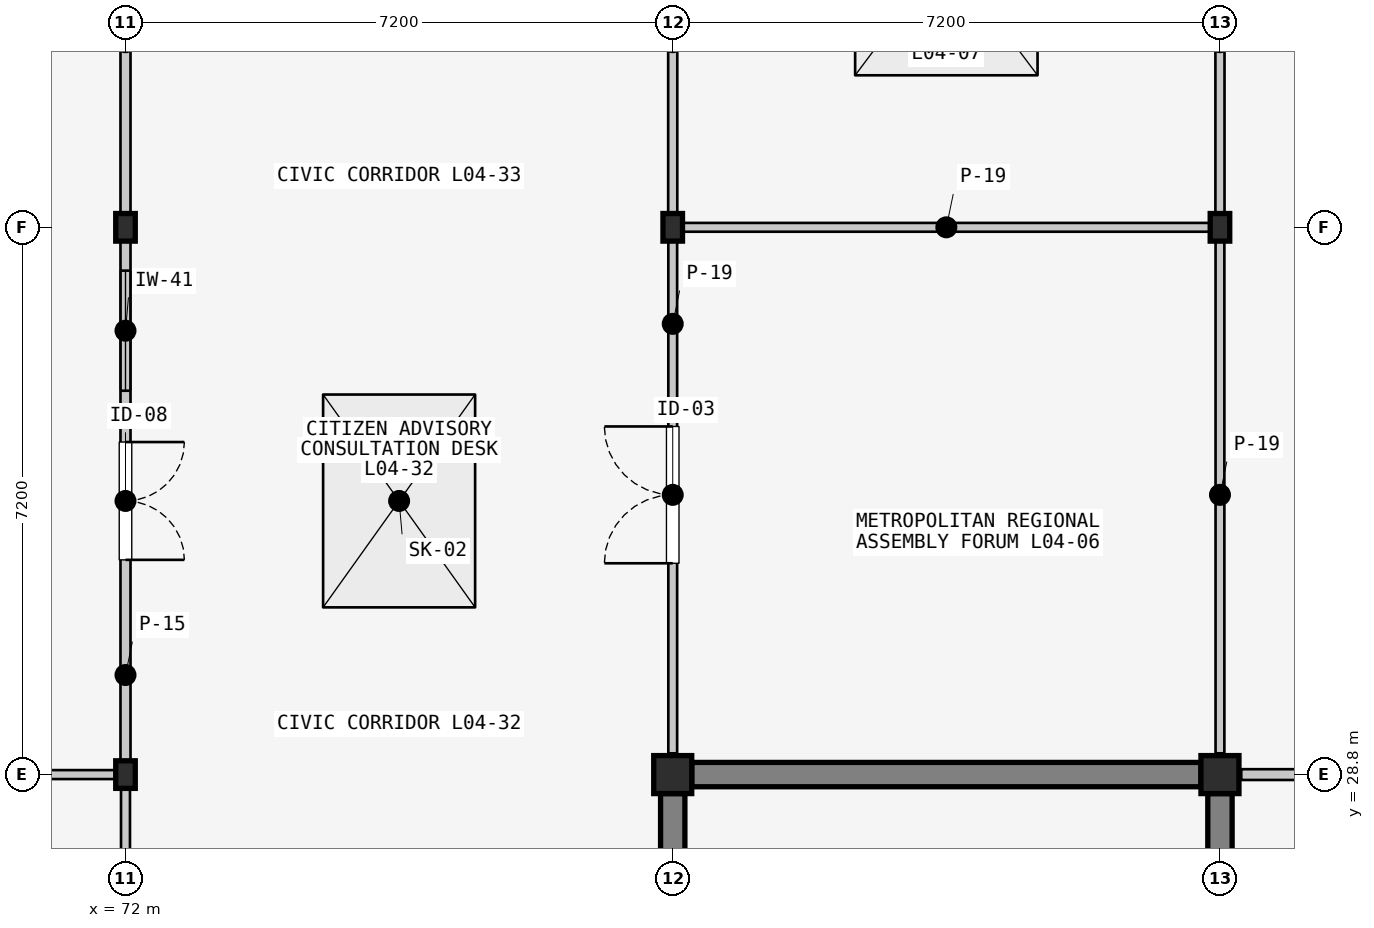
"""IFC4 building model, lengths in metres.
Left out: names, types, materials, properties, quantities, classifications, styles, units other than length and angle.
Written with IfcOpenShell. Run it as: python <this file> out.ifc"""

import sys

from ifc_helpers import new_model, si_unit, direction, frame, frame_2d, origin, origin_2d, place, context, subcontext, project, spatial, rectangle, i_section, extrude, element, fill, save


model = new_model("IFC4")
c1 = context("Model", 3, precision=1e-05, world=origin(), true_north=direction((0.0, 1.0)))
c2 = subcontext(c1, "Body", "Model", "MODEL_VIEW")
j1 = project(units=[si_unit("LENGTHUNIT", "METRE"), si_unit("PLANEANGLEUNIT", "RADIAN")], contexts=[c1])
p1 = place(None, origin())
s1 = spatial("IfcSite", under=j1, at=p1, CompositionType="ELEMENT")
p2 = place(p1, origin())
s2 = spatial("IfcBuilding", under=s1, at=p2, CompositionType="ELEMENT")
p3 = place(p2, frame((0.0, 0.0, 14.1)))
s3 = spatial("IfcBuildingStorey", under=s2, at=p3, CompositionType="ELEMENT", Elevation=14.1)
p4 = place(p3, frame((72.0, 28.8, 0.0), z_axis=(0.0, 0.0, 1.0), x_axis=(1.0, 0.0, 0.0)))
e1 = element("IfcColumn", 1, at=p4, inside=s3, PredefinedType="COLUMN", context=c2, shape_type="SweptSolid", body=[
    extrude(i_section(OverallWidth=0.257, OverallDepth=0.363, WebThickness=0.013, FlangeThickness=0.022, FilletRadius=0.015, at=origin_2d()), origin(), (0.0, 0.0, 1.0), 8.933),
])
p5 = place(p3, frame((72.0, 36.0, 0.0), z_axis=(0.0, 0.0, 1.0), x_axis=(1.0, 0.0, 0.0)))
e2 = element("IfcColumn", 2, at=p5, inside=s3, PredefinedType="COLUMN", context=c2, shape_type="SweptSolid", body=[
    extrude(i_section(OverallWidth=0.257, OverallDepth=0.363, WebThickness=0.013, FlangeThickness=0.022, FilletRadius=0.015, at=origin_2d()), origin(), (0.0, 0.0, 1.0), 10.276),
])
p6 = place(p3, frame((79.2, 28.8, 0.0), z_axis=(0.0, 0.0, 1.0), x_axis=(1.0, 0.0, 0.0)))
e3 = element("IfcColumn", 3, at=p6, inside=s3, PredefinedType="COLUMN", context=c2, shape_type="SweptSolid", body=[
    extrude(rectangle(XDim=0.5, YDim=0.5, at=origin_2d()), origin(), (0.0, 0.0, 1.0), 8.962),
])
p7 = place(p3, frame((79.2, 36.0, 0.0), z_axis=(0.0, 0.0, 1.0), x_axis=(1.0, 0.0, 0.0)))
e4 = element("IfcColumn", 4, at=p7, inside=s3, PredefinedType="COLUMN", context=c2, shape_type="SweptSolid", body=[
    extrude(i_section(OverallWidth=0.257, OverallDepth=0.363, WebThickness=0.013, FlangeThickness=0.022, FilletRadius=0.015, at=origin_2d()), origin(), (0.0, 0.0, 1.0), 10.305),
])
p8 = place(p3, frame((86.4, 28.8, 0.0), z_axis=(0.0, 0.0, 1.0), x_axis=(1.0, 0.0, 0.0)))
e5 = element("IfcColumn", 5, at=p8, inside=s3, PredefinedType="COLUMN", context=c2, shape_type="SweptSolid", body=[
    extrude(rectangle(XDim=0.5, YDim=0.5, at=origin_2d()), origin(), (0.0, 0.0, 1.0), 8.99),
])
p9 = place(p3, frame((86.4, 36.0, 0.0), z_axis=(0.0, 0.0, 1.0), x_axis=(1.0, 0.0, 0.0)))
e6 = element("IfcColumn", 6, at=p9, inside=s3, PredefinedType="COLUMN", context=c2, shape_type="SweptSolid", body=[
    extrude(i_section(OverallWidth=0.257, OverallDepth=0.363, WebThickness=0.013, FlangeThickness=0.022, FilletRadius=0.015, at=origin_2d()), origin(), (0.0, 0.0, 1.0), 10.333),
])
p10 = place(p3, frame((79.2, 28.55, 0.0), z_axis=(0.0, 0.0, 1.0), x_axis=(0.0, -1.0, 0.0)))
e7 = element("IfcWall", 7, at=p10, inside=s3, PredefinedType="SOLIDWALL", context=c2, shape_type="SweptSolid", body=[
    extrude(rectangle(XDim=6.7, YDim=0.32, at=frame_2d((3.35, 0.0))), origin(), (0.0, 0.0, 1.0), 6.936),
])
p11 = place(p3, frame((86.15, 28.8, 0.0), z_axis=(0.0, 0.0, 1.0), x_axis=(-1.0, 0.0, 0.0)))
e8 = element("IfcWall", 8, at=p11, inside=s3, PredefinedType="SOLIDWALL", context=c2, shape_type="SweptSolid", body=[
    extrude(rectangle(XDim=6.7, YDim=0.32, at=frame_2d((3.35, 0.0))), origin(), (0.0, 0.0, 1.0), 8.235),
])
p12 = place(p3, frame((86.4, 21.85, 0.0), z_axis=(0.0, 0.0, 1.0), x_axis=(0.0, 1.0, 0.0)))
e9 = element("IfcWall", 9, at=p12, inside=s3, PredefinedType="SOLIDWALL", context=c2, shape_type="SweptSolid", body=[
    extrude(rectangle(XDim=6.7, YDim=0.32, at=frame_2d((3.35, 0.0))), origin(), (0.0, 0.0, 1.0), 6.965),
])
for number, where, z_axis, x_axis in (
    (10, (64.92, 28.8, 0.0), (0.0, 0.0, 1.0), (1.0, 0.0, 0.0)),
    (11, (72.0, 28.68, 0.0), (0.0, 0.0, 1.0), (0.0, -1.0, 0.0)),
):
    element("IfcWall", number, at=place(p3, frame(where, z_axis=z_axis, x_axis=x_axis)), inside=s3, PredefinedType="PARTITIONING", context=c2, shape_type="SweptSolid", body=[
        extrude(rectangle(XDim=6.96, YDim=0.118, at=frame_2d((3.48, 0.0))), origin(), (0.0, 0.0, 1.0), 3.72),
    ])
p13 = place(p3, frame((72.0, 35.88, 0.0), z_axis=(0.0, 0.0, 1.0), x_axis=(0.0, -1.0, 0.0)))
e12 = element("IfcWall", 12, at=p13, inside=s3, PredefinedType="PARTITIONING", context=c2, shape_type="SweptSolid", body=[
    extrude(rectangle(XDim=6.96, YDim=0.132, at=frame_2d((3.48, 0.0))), origin(), (0.0, 0.0, 1.0), 3.72),
])
p14 = place(p13, frame((2.705, 0.0, 0.0)))
e13 = element("IfcOpeningElement", 13, at=p14, cuts=e12, PredefinedType="OPENING", context=c2, shape_type="SweptSolid", body=[
    extrude(rectangle(XDim=1.55, YDim=2.3, at=frame_2d((0.775, 1.15))), frame((0.0, 0.076, 0.0), z_axis=(0.0, -1.0, 0.0), x_axis=(1.0, 0.0, 0.0)), (0.0, 0.0, 1.0), 0.152),
])
p15 = place(p13, frame((0.45, 0.0, 1.05)))
e14 = element("IfcOpeningElement", 14, at=p15, cuts=e12, PredefinedType="OPENING", context=c2, shape_type="SweptSolid", body=[
    extrude(rectangle(XDim=1.58, YDim=1.34, at=frame_2d((0.79, 0.67))), frame((0.0, 0.076, 0.0), z_axis=(0.0, -1.0, 0.0), x_axis=(1.0, 0.0, 0.0)), (0.0, 0.0, 1.0), 0.152),
])
p16 = place(p3, frame((72.0, 43.08, 0.0), z_axis=(0.0, 0.0, 1.0), x_axis=(0.0, -1.0, 0.0)))
e15 = element("IfcWall", 15, at=p16, inside=s3, PredefinedType="PARTITIONING", context=c2, shape_type="SweptSolid", body=[
    extrude(rectangle(XDim=6.96, YDim=0.132, at=frame_2d((3.48, 0.0))), origin(), (0.0, 0.0, 1.0), 3.72),
])
p17 = place(p3, frame((79.2, 29.08, 0.0), z_axis=(0.0, 0.0, 1.0), x_axis=(0.0, 1.0, 0.0)))
e16 = element("IfcWall", 16, at=p17, inside=s3, PredefinedType="PARTITIONING", context=c2, shape_type="SweptSolid", body=[
    extrude(rectangle(XDim=6.8, YDim=0.116, at=frame_2d((3.4, 0.0))), origin(), (0.0, 0.0, 1.0), 3.72),
])
p18 = place(p17, frame((2.5, 0.0, 0.0)))
e17 = element("IfcOpeningElement", 17, at=p18, cuts=e16, PredefinedType="OPENING", context=c2, shape_type="SweptSolid", body=[
    extrude(rectangle(XDim=1.8, YDim=2.4, at=frame_2d((0.9, 1.2))), frame((0.0, 0.068, 0.0), z_axis=(0.0, -1.0, 0.0), x_axis=(1.0, 0.0, 0.0)), (0.0, 0.0, 1.0), 0.136),
])
p19 = place(p3, frame((79.32, 36.0, 0.0), z_axis=(0.0, 0.0, 1.0), x_axis=(1.0, 0.0, 0.0)))
e18 = element("IfcWall", 18, at=p19, inside=s3, PredefinedType="PARTITIONING", context=c2, shape_type="SweptSolid", body=[
    extrude(rectangle(XDim=6.96, YDim=0.116, at=frame_2d((3.48, 0.0))), origin(), (0.0, 0.0, 1.0), 3.72),
])
p20 = place(p3, frame((86.4, 35.88, 0.0), z_axis=(0.0, 0.0, 1.0), x_axis=(0.0, -1.0, 0.0)))
e19 = element("IfcWall", 19, at=p20, inside=s3, PredefinedType="PARTITIONING", context=c2, shape_type="SweptSolid", body=[
    extrude(rectangle(XDim=6.8, YDim=0.116, at=frame_2d((3.4, 0.0))), origin(), (0.0, 0.0, 1.0), 3.72),
])
for number, where, z_axis, x_axis in (
    (20, (79.2, 36.12, 0.0), (0.0, 0.0, 1.0), (0.0, 1.0, 0.0)),
    (21, (86.4, 42.92, 0.0), (0.0, 0.0, 1.0), (0.0, -1.0, 0.0)),
):
    element("IfcWall", number, at=place(p3, frame(where, z_axis=z_axis, x_axis=x_axis)), inside=s3, PredefinedType="PARTITIONING", context=c2, shape_type="SweptSolid", body=[
        extrude(rectangle(XDim=6.8, YDim=0.12, at=frame_2d((3.4, 0.0))), origin(), (0.0, 0.0, 1.0), 3.72),
    ])
p21 = place(p3, frame((86.68, 28.8, 0.0), z_axis=(0.0, 0.0, 1.0), x_axis=(1.0, 0.0, 0.0)))
e22 = element("IfcWall", 22, at=p21, inside=s3, PredefinedType="PARTITIONING", context=c2, shape_type="SweptSolid", body=[
    extrude(rectangle(XDim=6.64, YDim=0.142, at=frame_2d((3.32, 0.0))), origin(), (0.0, 0.0, 1.0), 3.72),
])
p22 = place(p3, frame((64.8, 7.2, 5.1), z_axis=(-0.003900009496, -0.183347177316, 0.983040488737), x_axis=(0.999992130387, 0.0, 0.003967261622)))
p23 = place(p22, frame((10.819, 25.635, 0.0)))
p24 = place(p23, origin())
e23 = element("IfcWindow", 23, at=p24, inside=s3, PartitioningType="SINGLE_PANEL", PredefinedType="SKYLIGHT", context=c2, shape_type="SweptSolid", body=[
    extrude(rectangle(XDim=2.0, YDim=2.8, at=origin_2d()), origin(), (0.0, 0.0, -1.0), 0.06),
])
p25 = place(p22, frame((18.024, 32.959, 0.0)))
p26 = place(p25, origin())
e24 = element("IfcWindow", 24, at=p26, inside=s3, PartitioningType="SINGLE_PANEL", PredefinedType="SKYLIGHT", context=c2, shape_type="SweptSolid", body=[
    extrude(rectangle(XDim=2.4, YDim=3.2, at=origin_2d()), origin(), (0.0, 0.0, -1.0), 0.06),
])
p27 = place(p14, origin())
e25 = element("IfcDoor", 25, at=p27, inside=s3, OperationType="DOUBLE_DOOR_SINGLE_SWING", PredefinedType="DOOR", context=c2, shape_type="SweptSolid", body=[
    extrude(rectangle(XDim=1.55, YDim=2.3, at=frame_2d((0.775, 1.15))), frame((0.0, 0.025, 0.0), z_axis=(0.0, -1.0, 0.0), x_axis=(1.0, 0.0, 0.0)), (0.0, 0.0, 1.0), 0.05),
])
fill(e13, e25)
p28 = place(p15, origin())
e26 = element("IfcWindow", 26, at=p28, inside=s3, PartitioningType="SINGLE_PANEL", PredefinedType="WINDOW", context=c2, shape_type="SweptSolid", body=[
    extrude(rectangle(XDim=1.58, YDim=1.34, at=frame_2d((0.79, 0.67))), frame((0.0, 0.03, 0.0), z_axis=(0.0, -1.0, 0.0), x_axis=(1.0, 0.0, 0.0)), (0.0, 0.0, 1.0), 0.06),
])
fill(e14, e26)
p29 = place(p18, origin())
e27 = element("IfcDoor", 27, at=p29, inside=s3, OperationType="DOUBLE_DOOR_SINGLE_SWING", PredefinedType="DOOR", context=c2, shape_type="SweptSolid", body=[
    extrude(rectangle(XDim=1.8, YDim=2.4, at=frame_2d((0.9, 1.2))), frame((0.0, 0.025, 0.0), z_axis=(0.0, -1.0, 0.0), x_axis=(1.0, 0.0, 0.0)), (0.0, 0.0, 1.0), 0.05),
])
fill(e17, e27)
save(model, sys.argv[1])
